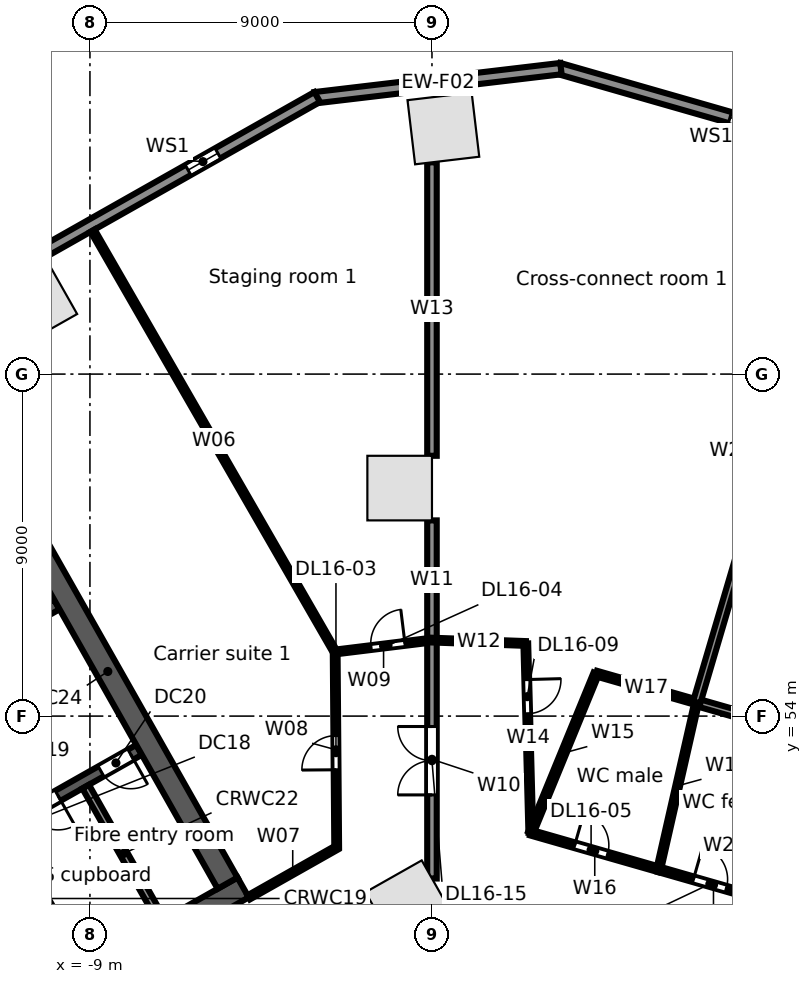
"""IFC4 building model, lengths in metres.
Left out: names, types, materials, properties, quantities, classifications, styles, units other than length and angle.
Written with IfcOpenShell. Run it as: python <this file> out.ifc"""

import sys

from ifc_helpers import new_model, si_unit, direction, frame, frame_2d, origin, origin_2d, place, context, subcontext, project, spatial, rectangle, extrude, element, fill, save


model = new_model("IFC4")
c1 = context("Model", 3, precision=1e-05, world=origin(), true_north=direction((0.0, 1.0)))
c2 = subcontext(c1, "Body", "Model", "MODEL_VIEW")
j1 = project(units=[si_unit("LENGTHUNIT", "METRE"), si_unit("PLANEANGLEUNIT", "RADIAN")], contexts=[c1])
p1 = place(None, origin())
s1 = spatial("IfcSite", under=j1, at=p1, CompositionType="ELEMENT")
p2 = place(p1, origin())
s2 = spatial("IfcBuilding", under=s1, at=p2, CompositionType="ELEMENT")
p3 = place(p2, frame((0.0, 0.0, 81.5)))
s3 = spatial("IfcBuildingStorey", under=s2, at=p3, CompositionType="ELEMENT", Elevation=81.5)
for number, where, z_axis, x_axis in (
    (1, (0.3, 69.464, 0.0), (0.0, 0.0, 1.0), (-0.993, -0.118, 0.0)),
    (2, (-10.495, 64.902, 0.0), (0.0, 0.0, 1.0), (-0.87, -0.492, 0.0)),
    (3, (-0.591, 49.044, 0.0), (0.0, 0.0, 1.0), (0.87, 0.492, 0.0)),
    (4, (-0.85, 60.0, 0.0), (0.0, 0.0, 1.0), (0.0, 1.0, 0.0)),
):
    element("IfcColumn", number, at=place(p3, frame(where, z_axis=z_axis, x_axis=x_axis)), inside=s3, PredefinedType="COLUMN", context=c2, shape_type="SweptSolid", body=[
        extrude(rectangle(XDim=1.7, YDim=1.7, at=origin_2d()), origin(), (0.0, 0.0, 1.0), 5.0),
    ])
p4 = place(p3, frame((3.335, 71.044, 0.0), z_axis=(0.0, 0.0, 1.0), x_axis=(0.961260130989, -0.275642813387, 0.0)))
e5 = element("IfcWall", 5, at=p4, inside=s3, PredefinedType="STANDARD", context=c2, shape_type="SweptSolid", body=[
    extrude(rectangle(XDim=32.741, YDim=0.3, at=frame_2d((16.371, 0.0))), origin(), (0.0, 0.0, 1.0), 4.68),
])
p5 = place(p4, frame((29.207, 0.0, 0.6)))
e6 = element("IfcOpeningElement", 6, at=p5, cuts=e5, PredefinedType="OPENING", context=c2, shape_type="SweptSolid", body=[
    extrude(rectangle(XDim=0.9, YDim=3.2, at=frame_2d((0.45, 1.6))), frame((0.0, 0.16, 0.0), z_axis=(0.0, -1.0, 0.0), x_axis=(1.0, 0.0, 0.0)), (0.0, 0.0, 1.0), 0.32),
])
p6 = place(p4, frame((21.034, 0.0, 0.6)))
e7 = element("IfcOpeningElement", 7, at=p6, cuts=e5, PredefinedType="OPENING", context=c2, shape_type="SweptSolid", body=[
    extrude(rectangle(XDim=0.9, YDim=3.2, at=frame_2d((0.45, 1.6))), frame((0.0, 0.16, 0.0), z_axis=(0.0, -1.0, 0.0), x_axis=(1.0, 0.0, 0.0)), (0.0, 0.0, 1.0), 0.32),
])
p7 = place(p4, frame((12.861, 0.0, 0.6)))
e8 = element("IfcOpeningElement", 8, at=p7, cuts=e5, PredefinedType="OPENING", context=c2, shape_type="SweptSolid", body=[
    extrude(rectangle(XDim=0.9, YDim=3.2, at=frame_2d((0.45, 1.6))), frame((0.0, 0.16, 0.0), z_axis=(0.0, -1.0, 0.0), x_axis=(1.0, 0.0, 0.0)), (0.0, 0.0, 1.0), 0.32),
])
p8 = place(p4, frame((4.688, 0.0, 0.6)))
e9 = element("IfcOpeningElement", 9, at=p8, cuts=e5, PredefinedType="OPENING", context=c2, shape_type="SweptSolid", body=[
    extrude(rectangle(XDim=0.9, YDim=3.2, at=frame_2d((0.45, 1.6))), frame((0.0, 0.16, 0.0), z_axis=(0.0, -1.0, 0.0), x_axis=(1.0, 0.0, 0.0)), (0.0, 0.0, 1.0), 0.32),
])
p9 = place(p3, frame((-3.076, 70.273, 0.0), z_axis=(0.0, 0.0, 1.0), x_axis=(0.993067743007, 0.117543429416, 0.0)))
e10 = element("IfcWall", 10, at=p9, inside=s3, PredefinedType="STANDARD", context=c2, shape_type="SweptSolid", body=[
    extrude(rectangle(XDim=6.516, YDim=0.3, at=frame_2d((3.258, 0.0))), origin(), (0.0, 0.0, 1.0), 4.68),
])
p10 = place(p3, frame((-58.745, 38.764, 0.0), z_axis=(0.0, 0.0, 1.0), x_axis=(0.870355811726, 0.492423355453, 0.0)))
e11 = element("IfcWall", 11, at=p10, inside=s3, PredefinedType="STANDARD", context=c2, shape_type="SweptSolid", body=[
    extrude(rectangle(XDim=64.025, YDim=0.3, at=frame_2d((32.013, 0.0))), origin(), (0.0, 0.0, 1.0), 4.68),
])
p11 = place(p10, frame((60.122, 0.0, 0.6)))
e12 = element("IfcOpeningElement", 12, at=p11, cuts=e11, PredefinedType="OPENING", context=c2, shape_type="SweptSolid", body=[
    extrude(rectangle(XDim=0.9, YDim=3.2, at=frame_2d((0.45, 1.6))), frame((0.0, 0.16, 0.0), z_axis=(0.0, -1.0, 0.0), x_axis=(1.0, 0.0, 0.0)), (0.0, 0.0, 1.0), 0.32),
])
p12 = place(p10, frame((50.992, 0.0, 0.6)))
e13 = element("IfcOpeningElement", 13, at=p12, cuts=e11, PredefinedType="OPENING", context=c2, shape_type="SweptSolid", body=[
    extrude(rectangle(XDim=0.9, YDim=3.2, at=frame_2d((0.45, 1.6))), frame((0.0, 0.16, 0.0), z_axis=(0.0, -1.0, 0.0), x_axis=(1.0, 0.0, 0.0)), (0.0, 0.0, 1.0), 0.32),
])
p13 = place(p10, frame((41.862, 0.0, 0.6)))
e14 = element("IfcOpeningElement", 14, at=p13, cuts=e11, PredefinedType="OPENING", context=c2, shape_type="SweptSolid", body=[
    extrude(rectangle(XDim=0.9, YDim=3.2, at=frame_2d((0.45, 1.6))), frame((0.0, 0.16, 0.0), z_axis=(0.0, -1.0, 0.0), x_axis=(1.0, 0.0, 0.0)), (0.0, 0.0, 1.0), 0.32),
])
p14 = place(p10, frame((32.732, 0.0, 0.6)))
e15 = element("IfcOpeningElement", 15, at=p14, cuts=e11, PredefinedType="OPENING", context=c2, shape_type="SweptSolid", body=[
    extrude(rectangle(XDim=0.9, YDim=3.2, at=frame_2d((0.45, 1.6))), frame((0.0, 0.16, 0.0), z_axis=(0.0, -1.0, 0.0), x_axis=(1.0, 0.0, 0.0)), (0.0, 0.0, 1.0), 0.32),
])
p15 = place(p10, frame((23.602, 0.0, 0.6)))
e16 = element("IfcOpeningElement", 16, at=p15, cuts=e11, PredefinedType="OPENING", context=c2, shape_type="SweptSolid", body=[
    extrude(rectangle(XDim=0.9, YDim=3.2, at=frame_2d((0.45, 1.6))), frame((0.0, 0.16, 0.0), z_axis=(0.0, -1.0, 0.0), x_axis=(1.0, 0.0, 0.0)), (0.0, 0.0, 1.0), 0.32),
])
p16 = place(p10, frame((14.472, 0.0, 0.6)))
e17 = element("IfcOpeningElement", 17, at=p16, cuts=e11, PredefinedType="OPENING", context=c2, shape_type="SweptSolid", body=[
    extrude(rectangle(XDim=0.9, YDim=3.2, at=frame_2d((0.45, 1.6))), frame((0.0, 0.16, 0.0), z_axis=(0.0, -1.0, 0.0), x_axis=(1.0, 0.0, 0.0)), (0.0, 0.0, 1.0), 0.32),
])
p17 = place(p10, frame((5.342, 0.0, 0.6)))
e18 = element("IfcOpeningElement", 18, at=p17, cuts=e11, PredefinedType="OPENING", context=c2, shape_type="SweptSolid", body=[
    extrude(rectangle(XDim=0.9, YDim=3.2, at=frame_2d((0.45, 1.6))), frame((0.0, 0.16, 0.0), z_axis=(0.0, -1.0, 0.0), x_axis=(1.0, 0.0, 0.0)), (0.0, 0.0, 1.0), 0.32),
])
p18 = place(p3, frame((-18.024, 42.104, 0.0), z_axis=(0.0, 0.0, 1.0), x_axis=(0.870360574057, 0.492414937962, 0.0)))
e19 = element("IfcWall", 19, at=p18, inside=s3, PredefinedType="SOLIDWALL", context=c2, shape_type="SweptSolid", body=[
    extrude(rectangle(XDim=15.0, YDim=0.6, at=frame_2d((7.5, 0.0))), origin(), (0.0, 0.0, 1.0), 4.68),
])
p19 = place(p18, frame((6.1, 0.0, 0.0)))
e20 = element("IfcOpeningElement", 20, at=p19, cuts=e19, PredefinedType="OPENING", context=c2, shape_type="SweptSolid", body=[
    extrude(rectangle(XDim=1.2, YDim=2.1, at=frame_2d((0.6, 1.05))), frame((0.0, 0.31, 0.0), z_axis=(0.0, -1.0, 0.0), x_axis=(1.0, 0.0, 0.0)), (0.0, 0.0, 1.0), 0.62),
])
p20 = place(p3, frame((-13.365, 49.911, 0.0), z_axis=(0.0, 0.0, 1.0), x_axis=(0.870340995471, 0.49244954219, 0.0)))
e21 = element("IfcWall", 21, at=p20, inside=s3, PredefinedType="SOLIDWALL", context=c2, shape_type="SweptSolid", body=[
    extrude(rectangle(XDim=6.5, YDim=0.3, at=frame_2d((3.25, 0.0))), origin(), (0.0, 0.0, 1.0), 4.68),
])
p21 = place(p20, frame((0.75, 0.0, 0.0)))
e22 = element("IfcOpeningElement", 22, at=p21, cuts=e21, PredefinedType="OPENING", context=c2, shape_type="SweptSolid", body=[
    extrude(rectangle(XDim=0.9, YDim=2.1, at=frame_2d((0.45, 1.05))), frame((0.0, 0.16, 0.0), z_axis=(0.0, -1.0, 0.0), x_axis=(1.0, 0.0, 0.0)), (0.0, 0.0, 1.0), 0.32),
])
p22 = place(p20, frame((3.15, 0.0, 0.0)))
e23 = element("IfcOpeningElement", 23, at=p22, cuts=e21, PredefinedType="OPENING", context=c2, shape_type="SweptSolid", body=[
    extrude(rectangle(XDim=0.9, YDim=2.1, at=frame_2d((0.45, 1.05))), frame((0.0, 0.16, 0.0), z_axis=(0.0, -1.0, 0.0), x_axis=(1.0, 0.0, 0.0)), (0.0, 0.0, 1.0), 0.32),
])
p23 = place(p20, frame((5.35, 0.0, 0.0)))
e24 = element("IfcOpeningElement", 24, at=p23, cuts=e21, PredefinedType="OPENING", context=c2, shape_type="SweptSolid", body=[
    extrude(rectangle(XDim=0.9, YDim=2.1, at=frame_2d((0.45, 1.05))), frame((0.0, 0.16, 0.0), z_axis=(0.0, -1.0, 0.0), x_axis=(1.0, 0.0, 0.0)), (0.0, 0.0, 1.0), 0.32),
])
p24 = place(p3, frame((-15.618, 53.691, 0.0), z_axis=(0.0, 0.0, 1.0), x_axis=(0.870356769198, 0.492421663121, 0.0)))
e25 = element("IfcWall", 25, at=p24, inside=s3, PredefinedType="SOLIDWALL", context=c2, shape_type="SweptSolid", body=[
    extrude(rectangle(XDim=6.6, YDim=0.3, at=frame_2d((3.3, 0.0))), origin(), (0.0, 0.0, 1.0), 4.68),
])
p25 = place(p24, frame((3.0, 0.0, 0.0)))
e26 = element("IfcOpeningElement", 26, at=p25, cuts=e25, PredefinedType="OPENING", context=c2, shape_type="SweptSolid", body=[
    extrude(rectangle(XDim=0.9, YDim=2.1, at=frame_2d((0.45, 1.05))), frame((0.0, 0.16, 0.0), z_axis=(0.0, -1.0, 0.0), x_axis=(1.0, 0.0, 0.0)), (0.0, 0.0, 1.0), 0.32),
])
p26 = place(p3, frame((-11.202, 50.962, 0.0), z_axis=(0.0, 0.0, 1.0), x_axis=(0.49241474071, -0.870360685654, 0.0)))
e27 = element("IfcWall", 27, at=p26, inside=s3, PredefinedType="PARTITIONING", context=c2, shape_type="SweptSolid", body=[
    extrude(rectangle(XDim=4.05, YDim=0.2, at=frame_2d((2.025, 0.0))), origin(), (0.0, 0.0, 1.0), 4.68),
])
p27 = place(p3, frame((-9.113, 52.144, 0.0), z_axis=(0.0, 0.0, 1.0), x_axis=(0.492394910396, -0.870371904542, 0.0)))
e28 = element("IfcWall", 28, at=p27, inside=s3, PredefinedType="PARTITIONING", context=c2, shape_type="SweptSolid", body=[
    extrude(rectangle(XDim=4.05, YDim=0.2, at=frame_2d((2.025, 0.0))), origin(), (0.0, 0.0, 1.0), 4.68),
])
p28 = place(p3, frame((-11.681, 60.744, 0.0), z_axis=(0.0, 0.0, 1.0), x_axis=(0.492426772896, -0.870353878221, 0.0)))
e29 = element("IfcWall", 29, at=p28, inside=s3, PredefinedType="SOLIDWALL", context=c2, shape_type="SweptSolid", body=[
    extrude(rectangle(XDim=12.8, YDim=0.6, at=frame_2d((6.4, 0.0))), origin(), (0.0, 0.0, 1.0), 4.68),
])
p29 = place(p3, frame((-8.931, 66.775, 0.0), z_axis=(0.0, 0.0, 1.0), x_axis=(0.498955759248, -0.866627457627, 0.0)))
e30 = element("IfcWall", 30, at=p29, inside=s3, PredefinedType="PARTITIONING", context=c2, shape_type="SweptSolid", body=[
    extrude(rectangle(XDim=12.794, YDim=0.125, at=frame_2d((6.397, 0.0))), origin(), (0.0, 0.0, 1.0), 3.76),
])
p30 = place(p3, frame((-4.821, 49.23, 0.0), z_axis=(0.0, 0.0, 1.0), x_axis=(0.870371217631, 0.492396124598, 0.0)))
e31 = element("IfcWall", 31, at=p30, inside=s3, PredefinedType="PARTITIONING", context=c2, shape_type="SweptSolid", body=[
    extrude(rectangle(XDim=2.659, YDim=0.125, at=frame_2d((1.329, 0.0))), origin(), (0.0, 0.0, 1.0), 4.68),
])
p31 = place(p3, frame((-2.547, 55.687, 0.0), z_axis=(0.0, 0.0, 1.0), x_axis=(0.007777437156, -0.999969755278, 0.0)))
e32 = element("IfcWall", 32, at=p31, inside=s3, PredefinedType="PARTITIONING", context=c2, shape_type="SweptSolid", body=[
    extrude(rectangle(XDim=5.148, YDim=0.125, at=frame_2d((2.574, 0.0))), origin(), (0.0, 0.0, 1.0), 4.68),
])
p32 = place(p31, frame((2.2, 0.0, 0.0)))
e33 = element("IfcOpeningElement", 33, at=p32, cuts=e32, PredefinedType="OPENING", context=c2, shape_type="SweptSolid", body=[
    extrude(rectangle(XDim=0.9, YDim=2.1, at=frame_2d((0.45, 1.05))), frame((0.0, 0.073, 0.0), z_axis=(0.0, -1.0, 0.0), x_axis=(1.0, 0.0, 0.0)), (0.0, 0.0, 1.0), 0.145),
])
p33 = place(p3, frame((-2.547, 55.687, 0.0), z_axis=(0.0, 0.0, 1.0), x_axis=(0.992534770107, 0.121962002806, 0.0)))
e34 = element("IfcWall", 34, at=p33, inside=s3, PredefinedType="PARTITIONING", context=c2, shape_type="SweptSolid", body=[
    extrude(rectangle(XDim=2.566, YDim=0.125, at=frame_2d((1.283, 0.0))), origin(), (0.0, 0.0, 1.0), 3.742),
])
p34 = place(p33, frame((0.95, 0.0, 0.0)))
e35 = element("IfcOpeningElement", 35, at=p34, cuts=e34, PredefinedType="OPENING", context=c2, shape_type="SweptSolid", body=[
    extrude(rectangle(XDim=0.9, YDim=2.1, at=frame_2d((0.45, 1.05))), frame((0.0, 0.073, 0.0), z_axis=(0.0, -1.0, 0.0), x_axis=(1.0, 0.0, 0.0)), (0.0, 0.0, 1.0), 0.145),
])
p35 = place(p3, frame((0.0, 49.726, 0.0), z_axis=(0.0, 0.0, 1.0), x_axis=(0.0, 1.0, 0.0)))
e36 = element("IfcWall", 36, at=p35, inside=s3, PredefinedType="PARTITIONING", context=c2, shape_type="SweptSolid", body=[
    extrude(rectangle(XDim=6.274, YDim=0.25, at=frame_2d((3.137, 0.0))), origin(), (0.0, 0.0, 1.0), 4.68),
])
p36 = place(p35, frame((2.2, 0.0, 0.0)))
e37 = element("IfcOpeningElement", 37, at=p36, cuts=e36, PredefinedType="OPENING", context=c2, shape_type="SweptSolid", body=[
    extrude(rectangle(XDim=1.8, YDim=2.1, at=frame_2d((0.9, 1.05))), frame((0.0, 0.135, 0.0), z_axis=(0.0, -1.0, 0.0), x_axis=(1.0, 0.0, 0.0)), (0.0, 0.0, 1.0), 0.27),
])
p37 = place(p3, frame((0.0, 56.0, 0.0), z_axis=(0.0, 0.0, 1.0), x_axis=(0.0, 1.0, 0.0)))
e38 = element("IfcWall", 38, at=p37, inside=s3, PredefinedType="PARTITIONING", context=c2, shape_type="SweptSolid", body=[
    extrude(rectangle(XDim=3.15, YDim=0.25, at=frame_2d((1.575, 0.0))), origin(), (0.0, 0.0, 1.0), 4.68),
])
p38 = place(p3, frame((0.0, 56.0, 0.0), z_axis=(0.0, 0.0, 1.0), x_axis=(0.999349313684, -0.036068673934, 0.0)))
e39 = element("IfcWall", 39, at=p38, inside=s3, PredefinedType="PARTITIONING", context=c2, shape_type="SweptSolid", body=[
    extrude(rectangle(XDim=2.471, YDim=0.125, at=frame_2d((1.235, 0.0))), origin(), (0.0, 0.0, 1.0), 4.68),
])
p39 = place(p3, frame((0.0, 60.85, 0.0), z_axis=(0.0, 0.0, 1.0), x_axis=(0.0, 1.0, 0.0)))
e40 = element("IfcWall", 40, at=p39, inside=s3, PredefinedType="PARTITIONING", context=c2, shape_type="SweptSolid", body=[
    extrude(rectangle(XDim=7.723, YDim=0.25, at=frame_2d((3.861, 0.0))), origin(), (0.0, 0.0, 1.0), 3.952),
])
p40 = place(p3, frame((2.469, 55.911, 0.0), z_axis=(0.0, 0.0, 1.0), x_axis=(0.02651808123, -0.999648333849, 0.0)))
e41 = element("IfcWall", 41, at=p40, inside=s3, PredefinedType="PARTITIONING", context=c2, shape_type="SweptSolid", body=[
    extrude(rectangle(XDim=4.981, YDim=0.125, at=frame_2d((2.49, 0.0))), origin(), (0.0, 0.0, 1.0), 4.68),
])
p41 = place(p40, frame((0.95, 0.0, 0.0)))
e42 = element("IfcOpeningElement", 42, at=p41, cuts=e41, PredefinedType="OPENING", context=c2, shape_type="SweptSolid", body=[
    extrude(rectangle(XDim=0.9, YDim=2.1, at=frame_2d((0.45, 1.05))), frame((0.0, 0.073, 0.0), z_axis=(0.0, -1.0, 0.0), x_axis=(1.0, 0.0, 0.0)), (0.0, 0.0, 1.0), 0.145),
])
p42 = place(p3, frame((2.601, 50.932, 0.0), z_axis=(0.0, 0.0, 1.0), x_axis=(0.380066317543, 0.924959239247, 0.0)))
e43 = element("IfcWall", 43, at=p42, inside=s3, PredefinedType="PARTITIONING", context=c2, shape_type="SweptSolid", body=[
    extrude(rectangle(XDim=4.528, YDim=0.15, at=frame_2d((2.264, 0.0))), origin(), (0.0, 0.0, 1.0), 4.68),
])
p43 = place(p3, frame((2.601, 50.932, 0.0), z_axis=(0.0, 0.0, 1.0), x_axis=(0.961265606965, -0.27562371608, 0.0)))
e44 = element("IfcWall", 44, at=p43, inside=s3, PredefinedType="PARTITIONING", context=c2, shape_type="SweptSolid", body=[
    extrude(rectangle(XDim=3.5, YDim=0.15, at=frame_2d((1.75, 0.0))), origin(), (0.0, 0.0, 1.0), 4.68),
])
p44 = place(p43, frame((1.2, 0.0, 0.0)))
e45 = element("IfcOpeningElement", 45, at=p44, cuts=e44, PredefinedType="OPENING", context=c2, shape_type="SweptSolid", body=[
    extrude(rectangle(XDim=0.9, YDim=2.1, at=frame_2d((0.45, 1.05))), frame((0.0, 0.085, 0.0), z_axis=(0.0, -1.0, 0.0), x_axis=(1.0, 0.0, 0.0)), (0.0, 0.0, 1.0), 0.17),
])
p45 = place(p3, frame((4.322, 55.12, 0.0), z_axis=(0.0, 0.0, 1.0), x_axis=(0.961272337704, -0.275600240865, 0.0)))
e46 = element("IfcWall", 46, at=p45, inside=s3, PredefinedType="PARTITIONING", context=c2, shape_type="SweptSolid", body=[
    extrude(rectangle(XDim=2.75, YDim=0.15, at=frame_2d((1.375, 0.0))), origin(), (0.0, 0.0, 1.0), 4.68),
])
p46 = place(p3, frame((5.966, 49.967, 0.0), z_axis=(0.0, 0.0, 1.0), x_axis=(0.221859891223, 0.975078555126, 0.0)))
e47 = element("IfcWall", 47, at=p46, inside=s3, PredefinedType="PARTITIONING", context=c2, shape_type="SweptSolid", body=[
    extrude(rectangle(XDim=4.507, YDim=0.125, at=frame_2d((2.254, 0.0))), origin(), (0.0, 0.0, 1.0), 4.68),
])
p47 = place(p3, frame((5.966, 49.967, 0.0), z_axis=(0.0, 0.0, 1.0), x_axis=(0.961222353496, -0.275774522283, 0.0)))
e48 = element("IfcWall", 48, at=p47, inside=s3, PredefinedType="PARTITIONING", context=c2, shape_type="SweptSolid", body=[
    extrude(rectangle(XDim=2.999, YDim=0.15, at=frame_2d((1.5, 0.0))), origin(), (0.0, 0.0, 1.0), 3.852),
])
p48 = place(p47, frame((0.95, 0.0, 0.0)))
e49 = element("IfcOpeningElement", 49, at=p48, cuts=e48, PredefinedType="OPENING", context=c2, shape_type="SweptSolid", body=[
    extrude(rectangle(XDim=0.9, YDim=2.1, at=frame_2d((0.45, 1.05))), frame((0.0, 0.085, 0.0), z_axis=(0.0, -1.0, 0.0), x_axis=(1.0, 0.0, 0.0)), (0.0, 0.0, 1.0), 0.17),
])
p49 = place(p3, frame((6.966, 54.362, 0.0), z_axis=(0.0, 0.0, 1.0), x_axis=(0.961245650832, -0.275693305607, 0.0)))
e50 = element("IfcWall", 50, at=p49, inside=s3, PredefinedType="PARTITIONING", context=c2, shape_type="SweptSolid", body=[
    extrude(rectangle(XDim=3.25, YDim=0.2, at=frame_2d((1.625, 0.0))), origin(), (0.0, 0.0, 1.0), 3.852),
])
p50 = place(p3, frame((6.966, 54.362, 0.0), z_axis=(0.0, 0.0, 1.0), x_axis=(0.283027392509, 0.959111826165, 0.0)))
e51 = element("IfcWall", 51, at=p50, inside=s3, PredefinedType="PARTITIONING", context=c2, shape_type="SweptSolid", body=[
    extrude(rectangle(XDim=12.985, YDim=0.2, at=frame_2d((6.492, 0.0))), origin(), (0.0, 0.0, 1.0), 3.742),
])
p51 = place(p8, origin())
e52 = element("IfcWindow", 52, at=p51, inside=s3, PartitioningType="SINGLE_PANEL", PredefinedType="WINDOW", context=c2, shape_type="SweptSolid", body=[
    extrude(rectangle(XDim=0.9, YDim=3.2, at=frame_2d((0.45, 1.6))), frame((0.0, 0.03, 0.0), z_axis=(0.0, -1.0, 0.0), x_axis=(1.0, 0.0, 0.0)), (0.0, 0.0, 1.0), 0.06),
])
fill(e9, e52)
p52 = place(p11, origin())
e53 = element("IfcWindow", 53, at=p52, inside=s3, PartitioningType="SINGLE_PANEL", PredefinedType="WINDOW", context=c2, shape_type="SweptSolid", body=[
    extrude(rectangle(XDim=0.9, YDim=3.2, at=frame_2d((0.45, 1.6))), frame((0.0, 0.03, 0.0), z_axis=(0.0, -1.0, 0.0), x_axis=(1.0, 0.0, 0.0)), (0.0, 0.0, 1.0), 0.06),
])
fill(e12, e53)
p53 = place(p22, frame((0.9, 0.0, 0.0), z_axis=(0.0, 0.0, 1.0), x_axis=(-1.0, 0.0, 0.0)))
e54 = element("IfcDoor", 54, at=p53, inside=s3, OperationType="SINGLE_SWING_LEFT", PredefinedType="DOOR", context=c2, shape_type="SweptSolid", body=[
    extrude(rectangle(XDim=0.9, YDim=2.1, at=frame_2d((0.45, 1.05))), frame((0.0, 0.025, 0.0), z_axis=(0.0, -1.0, 0.0), x_axis=(1.0, 0.0, 0.0)), (0.0, 0.0, 1.0), 0.05),
])
fill(e23, e54)
p54 = place(p23, frame((0.9, 0.0, 0.0), z_axis=(0.0, 0.0, 1.0), x_axis=(-1.0, 0.0, 0.0)))
e55 = element("IfcDoor", 55, at=p54, inside=s3, OperationType="SINGLE_SWING_LEFT", PredefinedType="DOOR", context=c2, shape_type="SweptSolid", body=[
    extrude(rectangle(XDim=0.9, YDim=2.1, at=frame_2d((0.45, 1.05))), frame((0.0, 0.025, 0.0), z_axis=(0.0, -1.0, 0.0), x_axis=(1.0, 0.0, 0.0)), (0.0, 0.0, 1.0), 0.05),
])
fill(e24, e55)
p55 = place(p32, frame((0.9, 0.0, 0.0), z_axis=(0.0, 0.0, 1.0), x_axis=(-1.0, 0.0, 0.0)))
e56 = element("IfcDoor", 56, at=p55, inside=s3, OperationType="SINGLE_SWING_LEFT", PredefinedType="DOOR", context=c2, shape_type="SweptSolid", body=[
    extrude(rectangle(XDim=0.9, YDim=2.1, at=frame_2d((0.45, 1.05))), frame((0.0, 0.025, 0.0), z_axis=(0.0, -1.0, 0.0), x_axis=(1.0, 0.0, 0.0)), (0.0, 0.0, 1.0), 0.05),
])
fill(e33, e56)
p56 = place(p34, origin())
e57 = element("IfcDoor", 57, at=p56, inside=s3, OperationType="SINGLE_SWING_RIGHT", PredefinedType="DOOR", context=c2, shape_type="SweptSolid", body=[
    extrude(rectangle(XDim=0.9, YDim=2.1, at=frame_2d((0.45, 1.05))), frame((0.0, 0.025, 0.0), z_axis=(0.0, -1.0, 0.0), x_axis=(1.0, 0.0, 0.0)), (0.0, 0.0, 1.0), 0.05),
])
fill(e35, e57)
p57 = place(p44, origin())
e58 = element("IfcDoor", 58, at=p57, inside=s3, OperationType="SINGLE_SWING_LEFT", PredefinedType="DOOR", context=c2, shape_type="SweptSolid", body=[
    extrude(rectangle(XDim=0.9, YDim=2.1, at=frame_2d((0.45, 1.05))), frame((0.0, 0.025, 0.0), z_axis=(0.0, -1.0, 0.0), x_axis=(1.0, 0.0, 0.0)), (0.0, 0.0, 1.0), 0.05),
])
fill(e45, e58)
p58 = place(p48, origin())
e59 = element("IfcDoor", 59, at=p58, inside=s3, OperationType="SINGLE_SWING_LEFT", PredefinedType="DOOR", context=c2, shape_type="SweptSolid", body=[
    extrude(rectangle(XDim=0.9, YDim=2.1, at=frame_2d((0.45, 1.05))), frame((0.0, 0.025, 0.0), z_axis=(0.0, -1.0, 0.0), x_axis=(1.0, 0.0, 0.0)), (0.0, 0.0, 1.0), 0.05),
])
fill(e49, e59)
p59 = place(p41, origin())
e60 = element("IfcDoor", 60, at=p59, inside=s3, OperationType="SINGLE_SWING_LEFT", PredefinedType="DOOR", context=c2, shape_type="SweptSolid", body=[
    extrude(rectangle(XDim=0.9, YDim=2.1, at=frame_2d((0.45, 1.05))), frame((0.0, 0.025, 0.0), z_axis=(0.0, -1.0, 0.0), x_axis=(1.0, 0.0, 0.0)), (0.0, 0.0, 1.0), 0.05),
])
fill(e42, e60)
p60 = place(p36, origin())
e61 = element("IfcDoor", 61, at=p60, inside=s3, OperationType="DOUBLE_DOOR_SINGLE_SWING", PredefinedType="DOOR", context=c2, shape_type="SweptSolid", body=[
    extrude(rectangle(XDim=1.8, YDim=2.1, at=frame_2d((0.9, 1.05))), frame((0.0, 0.025, 0.0), z_axis=(0.0, -1.0, 0.0), x_axis=(1.0, 0.0, 0.0)), (0.0, 0.0, 1.0), 0.05),
])
fill(e37, e61)
save(model, sys.argv[1])
